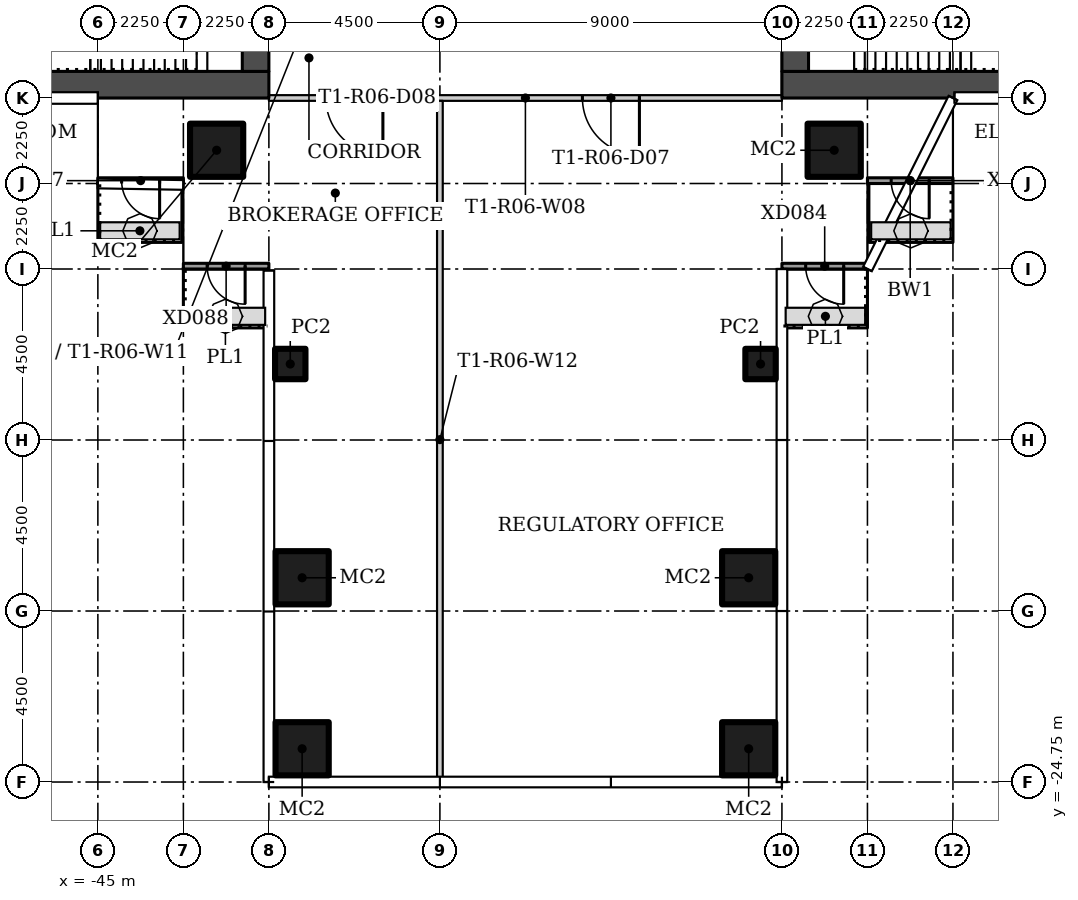
"""IFC4 building model, lengths in metres.
Left out: names, types, materials, properties, quantities, classifications, styles, units other than length and angle.
Written with IfcOpenShell. Run it as: python <this file> out.ifc"""

import sys

from ifc_helpers import new_model, si_unit, direction, frame, frame_2d, origin, origin_2d, place, context, subcontext, project, spatial, rectangle, hollow_rectangle, extrude, element, fill, save


model = new_model("IFC4")
c1 = context("Model", 3, precision=1e-05, world=origin(), true_north=direction((0.0, 1.0)))
c2 = subcontext(c1, "Body", "Model", "MODEL_VIEW")
j1 = project(units=[si_unit("LENGTHUNIT", "METRE"), si_unit("PLANEANGLEUNIT", "RADIAN")], contexts=[c1])
p1 = place(None, origin())
s1 = spatial("IfcSite", under=j1, at=p1, CompositionType="ELEMENT")
p2 = place(p1, origin())
s2 = spatial("IfcBuilding", under=s1, at=p2, CompositionType="ELEMENT")
p3 = place(p2, frame((0.0, 0.0, 65.4)))
s3 = spatial("IfcBuildingStorey", under=s2, at=p3, CompositionType="ELEMENT", Elevation=65.4)
for number, where in (
    (1, (-25.625, -8.125, 0.0)),
    (2, (-41.875, -8.125, 0.0)),
):
    element("IfcColumn", number, at=place(p3, frame(where)), inside=s3, PredefinedType="COLUMN", context=c2, shape_type="SweptSolid", body=[
        extrude(hollow_rectangle(XDim=1.4, YDim=1.4, WallThickness=0.05, at=origin_2d()), origin(), (0.0, 0.0, 1.0), 3.55),
    ])
p4 = place(p3, frame((-39.938, -13.75, 0.0)))
e3 = element("IfcColumn", 3, at=p4, inside=s3, PredefinedType="COLUMN", context=c2, shape_type="SweptSolid", body=[
    extrude(hollow_rectangle(XDim=0.8, YDim=0.8, WallThickness=0.025, at=origin_2d()), origin(), (0.0, 0.0, 1.0), 3.55),
])
for number, where in (
    (4, (-39.625, -19.375, 0.0)),
    (5, (-39.625, -23.875, 0.0)),
):
    element("IfcColumn", number, at=place(p3, frame(where)), inside=s3, PredefinedType="COLUMN", context=c2, shape_type="SweptSolid", body=[
        extrude(hollow_rectangle(XDim=1.4, YDim=1.4, WallThickness=0.05, at=origin_2d()), origin(), (0.0, 0.0, 1.0), 3.55),
    ])
p5 = place(p3, frame((-27.562, -13.75, 0.0)))
e6 = element("IfcColumn", 6, at=p5, inside=s3, PredefinedType="COLUMN", context=c2, shape_type="SweptSolid", body=[
    extrude(hollow_rectangle(XDim=0.8, YDim=0.8, WallThickness=0.025, at=origin_2d()), origin(), (0.0, 0.0, 1.0), 3.55),
])
for number, where in (
    (7, (-27.875, -19.375, 0.0)),
    (8, (-27.875, -23.875, 0.0)),
):
    element("IfcColumn", number, at=place(p3, frame(where)), inside=s3, PredefinedType="COLUMN", context=c2, shape_type="SweptSolid", body=[
        extrude(hollow_rectangle(XDim=1.4, YDim=1.4, WallThickness=0.05, at=origin_2d()), origin(), (0.0, 0.0, 1.0), 3.55),
    ])
p6 = place(p3, frame((-27.0, -6.75, 0.0), z_axis=(0.0, 0.0, 1.0), x_axis=(-1.0, 0.0, 0.0)))
e9 = element("IfcWall", 9, at=p6, inside=s3, PredefinedType="PARTITIONING", context=c2, shape_type="SweptSolid", body=[
    extrude(rectangle(XDim=13.5, YDim=0.15, at=frame_2d((6.75, 0.0))), origin(), (0.0, 0.0, 1.0), 3.55),
])
p7 = place(p6, frame((3.75, 0.0, 0.0)))
e10 = element("IfcOpeningElement", 10, at=p7, cuts=e9, PredefinedType="OPENING", context=c2, shape_type="SweptSolid", body=[
    extrude(rectangle(XDim=1.5, YDim=2.1, at=frame_2d((0.75, 1.05))), frame((0.0, 0.085, 0.0), z_axis=(0.0, -1.0, 0.0), x_axis=(1.0, 0.0, 0.0)), (0.0, 0.0, 1.0), 0.17),
])
p8 = place(p6, frame((10.5, 0.0, 0.0)))
e11 = element("IfcOpeningElement", 11, at=p8, cuts=e9, PredefinedType="OPENING", context=c2, shape_type="SweptSolid", body=[
    extrude(rectangle(XDim=1.5, YDim=2.1, at=frame_2d((0.75, 1.05))), frame((0.0, 0.085, 0.0), z_axis=(0.0, -1.0, 0.0), x_axis=(1.0, 0.0, 0.0)), (0.0, 0.0, 1.0), 0.17),
])
p9 = place(p3, frame((-36.0, -24.655, 0.0), z_axis=(0.0, 0.0, 1.0), x_axis=(0.0, 1.0, 0.0)))
e12 = element("IfcWall", 12, at=p9, inside=s3, PredefinedType="PARTITIONING", context=c2, shape_type="SweptSolid", body=[
    extrude(rectangle(XDim=17.83, YDim=0.15, at=frame_2d((8.915, 0.0))), origin(), (0.0, 0.0, 1.0), 3.55),
])
p10 = place(p3, frame((-22.5, -8.925, 0.0), z_axis=(0.0, 0.0, 1.0), x_axis=(-1.0, 0.0, 0.0)))
e13 = element("IfcWall", 13, at=p10, inside=s3, PredefinedType="SOLIDWALL", context=c2, shape_type="SweptSolid", body=[
    extrude(rectangle(XDim=2.25, YDim=0.15, at=frame_2d((1.125, 0.0))), origin(), (0.0, 0.0, 1.0), 3.45),
])
p11 = place(p10, frame((0.625, 0.0, 0.0)))
e14 = element("IfcOpeningElement", 14, at=p11, cuts=e13, PredefinedType="OPENING", context=c2, shape_type="SweptSolid", body=[
    extrude(rectangle(XDim=1.0, YDim=2.4, at=frame_2d((0.5, 1.2))), frame((0.0, 0.085, 0.0), z_axis=(0.0, -1.0, 0.0), x_axis=(1.0, 0.0, 0.0)), (0.0, 0.0, 1.0), 0.17),
])
p12 = place(p3, frame((-24.75, -11.175, 0.0), z_axis=(0.0, 0.0, 1.0), x_axis=(-1.0, 0.0, 0.0)))
e15 = element("IfcWall", 15, at=p12, inside=s3, PredefinedType="SOLIDWALL", context=c2, shape_type="SweptSolid", body=[
    extrude(rectangle(XDim=2.25, YDim=0.15, at=frame_2d((1.125, 0.0))), origin(), (0.0, 0.0, 1.0), 3.45),
])
p13 = place(p12, frame((0.625, 0.0, 0.0)))
e16 = element("IfcOpeningElement", 16, at=p13, cuts=e15, PredefinedType="OPENING", context=c2, shape_type="SweptSolid", body=[
    extrude(rectangle(XDim=1.0, YDim=2.4, at=frame_2d((0.5, 1.2))), frame((0.0, 0.085, 0.0), z_axis=(0.0, -1.0, 0.0), x_axis=(1.0, 0.0, 0.0)), (0.0, 0.0, 1.0), 0.17),
])
p14 = place(p3, frame((-42.75, -8.925, 0.0), z_axis=(0.0, 0.0, 1.0), x_axis=(-1.0, 0.0, 0.0)))
e17 = element("IfcWall", 17, at=p14, inside=s3, PredefinedType="SOLIDWALL", context=c2, shape_type="SweptSolid", body=[
    extrude(rectangle(XDim=2.25, YDim=0.15, at=frame_2d((1.125, 0.0))), origin(), (0.0, 0.0, 1.0), 3.45),
])
p15 = place(p14, frame((0.625, 0.0, 0.0)))
e18 = element("IfcOpeningElement", 18, at=p15, cuts=e17, PredefinedType="OPENING", context=c2, shape_type="SweptSolid", body=[
    extrude(rectangle(XDim=1.0, YDim=2.4, at=frame_2d((0.5, 1.2))), frame((0.0, 0.085, 0.0), z_axis=(0.0, -1.0, 0.0), x_axis=(1.0, 0.0, 0.0)), (0.0, 0.0, 1.0), 0.17),
])
p16 = place(p3, frame((-40.5, -11.175, 0.0), z_axis=(0.0, 0.0, 1.0), x_axis=(-1.0, 0.0, 0.0)))
e19 = element("IfcWall", 19, at=p16, inside=s3, PredefinedType="SOLIDWALL", context=c2, shape_type="SweptSolid", body=[
    extrude(rectangle(XDim=2.25, YDim=0.15, at=frame_2d((1.125, 0.0))), origin(), (0.0, 0.0, 1.0), 3.45),
])
p17 = place(p16, frame((0.625, 0.0, 0.0)))
e20 = element("IfcOpeningElement", 20, at=p17, cuts=e19, PredefinedType="OPENING", context=c2, shape_type="SweptSolid", body=[
    extrude(rectangle(XDim=1.0, YDim=2.4, at=frame_2d((0.5, 1.2))), frame((0.0, 0.085, 0.0), z_axis=(0.0, -1.0, 0.0), x_axis=(1.0, 0.0, 0.0)), (0.0, 0.0, 1.0), 0.17),
])
p18 = place(p3, frame((-27.0, -6.4, 0.0)))
e21 = element("IfcWall", 21, at=p18, inside=s3, PredefinedType="SHEAR", context=c2, shape_type="SweptSolid", body=[
    extrude(rectangle(XDim=13.5, YDim=0.7, at=frame_2d((6.75, 0.0))), origin(), (0.0, 0.0, 1.0), 3.55),
])
p19 = place(p3, frame((-26.65, 6.05, 0.0), z_axis=(0.0, 0.0, 1.0), x_axis=(0.0, -1.0, 0.0)))
e22 = element("IfcWall", 22, at=p19, inside=s3, PredefinedType="SHEAR", context=c2, shape_type="SweptSolid", body=[
    extrude(rectangle(XDim=12.1, YDim=0.7, at=frame_2d((6.05, 0.0))), origin(), (0.0, 0.0, 1.0), 3.55),
])
p20 = place(p19, frame((3.9, 0.0, 0.0)))
e23 = element("IfcOpeningElement", 23, at=p20, cuts=e22, PredefinedType="OPENING", context=c2, shape_type="SweptSolid", body=[
    extrude(rectangle(XDim=1.8, YDim=2.4, at=frame_2d((0.9, 1.2))), frame((0.0, 0.36, 0.0), z_axis=(0.0, -1.0, 0.0), x_axis=(1.0, 0.0, 0.0)), (0.0, 0.0, 1.0), 0.72),
])
p21 = place(p3, frame((-40.5, -6.4, 0.0), z_axis=(0.0, 0.0, 1.0), x_axis=(-1.0, 0.0, 0.0)))
e24 = element("IfcWall", 24, at=p21, inside=s3, PredefinedType="SHEAR", context=c2, shape_type="SweptSolid", body=[
    extrude(rectangle(XDim=13.5, YDim=0.7, at=frame_2d((6.75, 0.0))), origin(), (0.0, 0.0, 1.0), 3.55),
])
p22 = place(p3, frame((-40.85, -6.05, 0.0), z_axis=(0.0, 0.0, 1.0), x_axis=(0.0, 1.0, 0.0)))
e25 = element("IfcWall", 25, at=p22, inside=s3, PredefinedType="SHEAR", context=c2, shape_type="SweptSolid", body=[
    extrude(rectangle(XDim=12.1, YDim=0.7, at=frame_2d((6.05, 0.0))), origin(), (0.0, 0.0, 1.0), 3.55),
])
p23 = place(p22, frame((6.4, 0.0, 0.0)))
e26 = element("IfcOpeningElement", 26, at=p23, cuts=e25, PredefinedType="OPENING", context=c2, shape_type="SweptSolid", body=[
    extrude(rectangle(XDim=1.8, YDim=2.4, at=frame_2d((0.9, 1.2))), frame((0.0, 0.36, 0.0), z_axis=(0.0, -1.0, 0.0), x_axis=(1.0, 0.0, 0.0)), (0.0, 0.0, 1.0), 0.72),
])
p24 = place(p7, origin())
e27 = element("IfcDoor", 27, at=p24, inside=s3, OperationType="DOUBLE_DOOR_SINGLE_SWING", PredefinedType="DOOR", context=c2, shape_type="SweptSolid", body=[
    extrude(rectangle(XDim=1.5, YDim=2.1, at=frame_2d((0.75, 1.05))), frame((0.0, 0.025, 0.0), z_axis=(0.0, -1.0, 0.0), x_axis=(1.0, 0.0, 0.0)), (0.0, 0.0, 1.0), 0.05),
])
fill(e10, e27)
p25 = place(p8, origin())
e28 = element("IfcDoor", 28, at=p25, inside=s3, OperationType="DOUBLE_DOOR_SINGLE_SWING", PredefinedType="DOOR", context=c2, shape_type="SweptSolid", body=[
    extrude(rectangle(XDim=1.5, YDim=2.1, at=frame_2d((0.75, 1.05))), frame((0.0, 0.025, 0.0), z_axis=(0.0, -1.0, 0.0), x_axis=(1.0, 0.0, 0.0)), (0.0, 0.0, 1.0), 0.05),
])
fill(e11, e28)
p26 = place(p11, origin())
e29 = element("IfcDoor", 29, at=p26, inside=s3, OperationType="SINGLE_SWING_RIGHT", PredefinedType="DOOR", context=c2, shape_type="SweptSolid", body=[
    extrude(rectangle(XDim=1.0, YDim=2.4, at=frame_2d((0.5, 1.2))), frame((0.0, 0.025, 0.0), z_axis=(0.0, -1.0, 0.0), x_axis=(1.0, 0.0, 0.0)), (0.0, 0.0, 1.0), 0.05),
])
fill(e14, e29)
p27 = place(p13, origin())
e30 = element("IfcDoor", 30, at=p27, inside=s3, OperationType="SINGLE_SWING_LEFT", PredefinedType="DOOR", context=c2, shape_type="SweptSolid", body=[
    extrude(rectangle(XDim=1.0, YDim=2.4, at=frame_2d((0.5, 1.2))), frame((0.0, 0.025, 0.0), z_axis=(0.0, -1.0, 0.0), x_axis=(1.0, 0.0, 0.0)), (0.0, 0.0, 1.0), 0.05),
])
fill(e16, e30)
p28 = place(p15, origin())
e31 = element("IfcDoor", 31, at=p28, inside=s3, OperationType="SINGLE_SWING_LEFT", PredefinedType="DOOR", context=c2, shape_type="SweptSolid", body=[
    extrude(rectangle(XDim=1.0, YDim=2.4, at=frame_2d((0.5, 1.2))), frame((0.0, 0.025, 0.0), z_axis=(0.0, -1.0, 0.0), x_axis=(1.0, 0.0, 0.0)), (0.0, 0.0, 1.0), 0.05),
])
fill(e18, e31)
p29 = place(p17, origin())
e32 = element("IfcDoor", 32, at=p29, inside=s3, OperationType="SINGLE_SWING_RIGHT", PredefinedType="DOOR", context=c2, shape_type="SweptSolid", body=[
    extrude(rectangle(XDim=1.0, YDim=2.4, at=frame_2d((0.5, 1.2))), frame((0.0, 0.025, 0.0), z_axis=(0.0, -1.0, 0.0), x_axis=(1.0, 0.0, 0.0)), (0.0, 0.0, 1.0), 0.05),
])
fill(e20, e32)
save(model, sys.argv[1])
